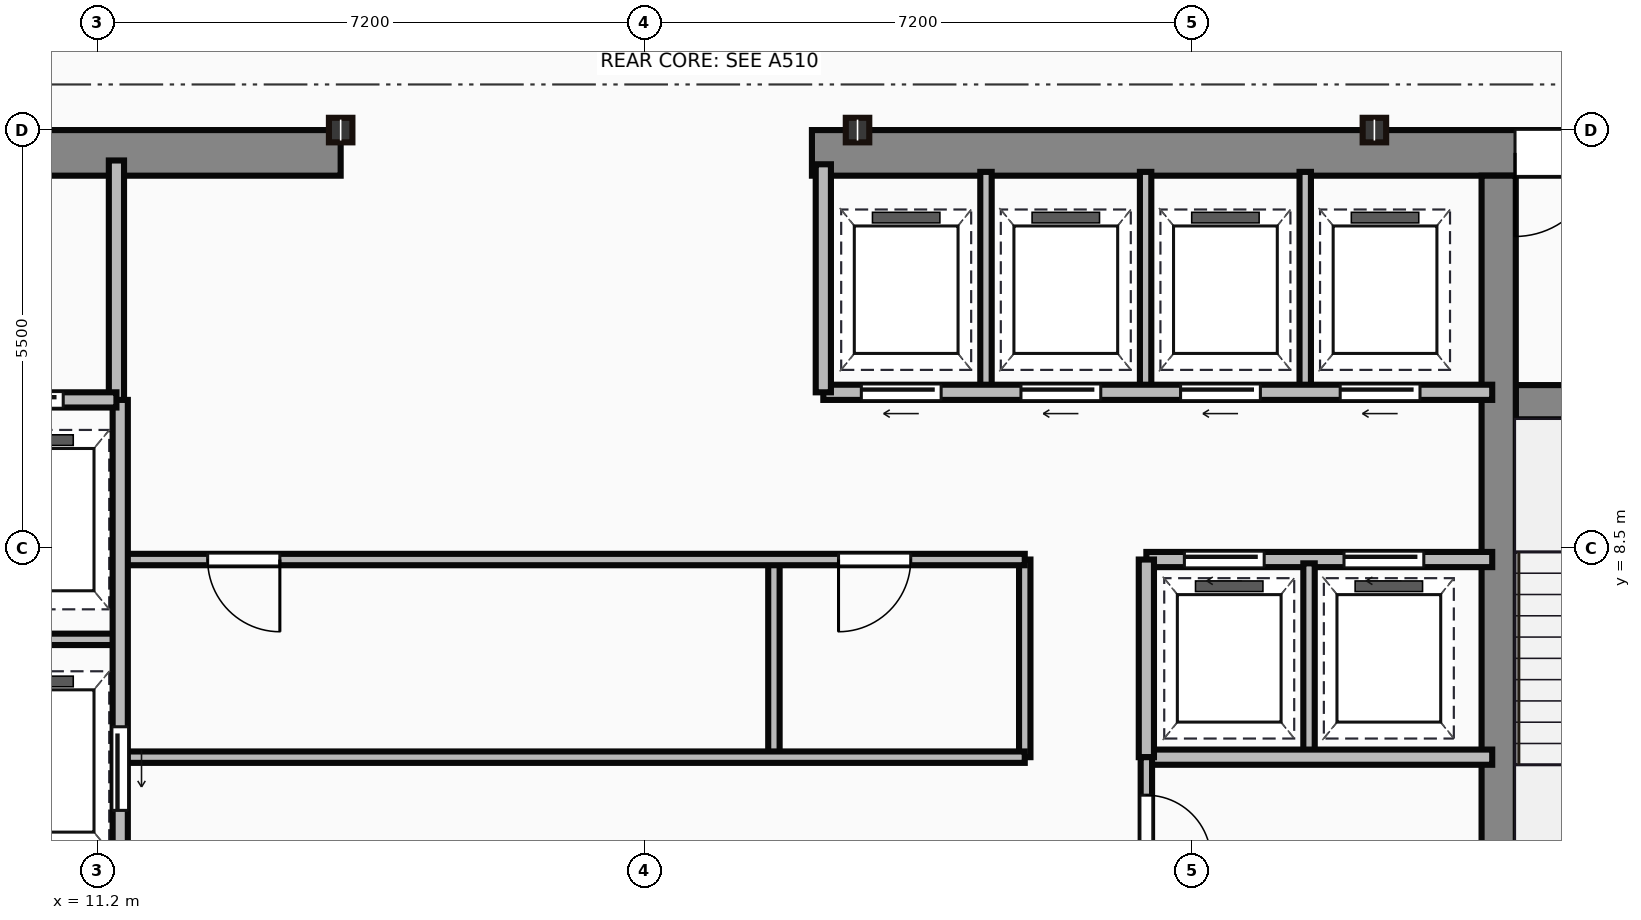
"""IFC4 building model, lengths in metres.
Left out: names, types, materials, properties, quantities, classifications, styles, units other than length and angle.
Written with IfcOpenShell. Run it as: python <this file> out.ifc"""

import sys

from ifc_helpers import new_model, si_unit, direction, frame, frame_2d, origin, origin_2d, place, context, subcontext, project, spatial, rectangle, i_section, extrude, source, transform, mapped, element, fill, save


model = new_model("IFC4")
c1 = context("Model", 3, precision=1e-05, world=origin(), true_north=direction((0.0, 1.0)))
c2 = subcontext(c1, "Body", "Model", "MODEL_VIEW")
j1 = project(units=[si_unit("LENGTHUNIT", "METRE"), si_unit("PLANEANGLEUNIT", "RADIAN")], contexts=[c1])
p1 = place(None, origin())
s1 = spatial("IfcSite", under=j1, at=p1, CompositionType="ELEMENT")
p2 = place(p1, origin())
s2 = spatial("IfcBuilding", under=s1, at=p2, CompositionType="ELEMENT")
p3 = place(p2, frame((0.0, 0.0, 244.2)))
s3 = spatial("IfcBuildingStorey", under=s2, at=p3, CompositionType="ELEMENT", Elevation=244.2)
m1 = source(origin(), c2, "Body", "SweptSolid", [
    extrude(rectangle(XDim=9.1, YDim=0.6, at=frame_2d((4.55, 0.0))), origin(), (0.0, 0.0, 1.0), 3.65),
])
p4 = place(p3, frame((5.3, 13.7, 0.0), z_axis=(0.0, 0.0, 1.0), x_axis=(1.0, 0.0, 0.0)))
e1 = element("IfcWall", 1, at=p4, inside=s3, PredefinedType="SHEAR", context=c2, shape_type="MappedRepresentation", body=[
    mapped(m1, transform((0.0, 0.0, 0.0))),
])
p5 = place(p4, frame((4.1, 0.0, 0.0)))
e2 = element("IfcOpeningElement", 2, at=p5, cuts=e1, PredefinedType="OPENING", context=c2, shape_type="SweptSolid", body=[
    extrude(rectangle(XDim=1.1, YDim=2.15, at=frame_2d((0.55, 1.075))), frame((0.0, 0.31, 0.0), z_axis=(0.0, -1.0, 0.0), x_axis=(1.0, 0.0, 0.0)), (0.0, 0.0, 1.0), 0.62),
])
m2 = source(origin(), c2, "Body", "SweptSolid", [
    extrude(rectangle(XDim=12.6, YDim=0.6, at=frame_2d((6.3, 0.0))), origin(), (0.0, 0.0, 1.0), 3.65),
])
p6 = place(p3, frame((20.6, 13.7, 0.0), z_axis=(0.0, 0.0, 1.0), x_axis=(1.0, 0.0, 0.0)))
e3 = element("IfcWall", 3, at=p6, inside=s3, PredefinedType="SHEAR", context=c2, shape_type="MappedRepresentation", body=[
    mapped(m2, transform((0.0, 0.0, 0.0))),
])
p7 = place(p6, frame((9.25, 0.0, 0.0)))
e4 = element("IfcOpeningElement", 4, at=p7, cuts=e3, PredefinedType="OPENING", context=c2, shape_type="SweptSolid", body=[
    extrude(rectangle(XDim=1.1, YDim=2.15, at=frame_2d((0.55, 1.075))), frame((0.0, 0.31, 0.0), z_axis=(0.0, -1.0, 0.0), x_axis=(1.0, 0.0, 0.0)), (0.0, 0.0, 1.0), 0.62),
])
m3 = source(origin(), c2, "Body", "SweptSolid", [
    extrude(rectangle(XDim=12.5, YDim=0.45, at=frame_2d((6.25, 0.0))), origin(), (0.0, 0.0, 1.0), 3.65),
])
p8 = place(p3, frame((29.635, 0.9, 0.0), z_axis=(0.0, 0.0, 1.0), x_axis=(0.0, 1.0, 0.0)))
e5 = element("IfcWall", 5, at=p8, inside=s3, PredefinedType="SHEAR", context=c2, shape_type="MappedRepresentation", body=[
    mapped(m3, transform((0.0, 0.0, 0.0))),
])
m4 = source(origin(), c2, "Body", "SweptSolid", [
    extrude(rectangle(XDim=3.39, YDim=0.45, at=frame_2d((1.695, 0.0))), origin(), (0.0, 0.0, 1.0), 3.65),
])
p9 = place(p3, frame((29.86, 10.42, 0.0), z_axis=(0.0, 0.0, 1.0), x_axis=(1.0, 0.0, 0.0)))
e6 = element("IfcWall", 6, at=p9, inside=s3, PredefinedType="SHEAR", context=c2, shape_type="MappedRepresentation", body=[
    mapped(m4, transform((0.0, 0.0, 0.0))),
])
p10 = place(p9, frame((1.1, 0.0, 0.0)))
e7 = element("IfcOpeningElement", 7, at=p10, cuts=e6, PredefinedType="OPENING", context=c2, shape_type="SweptSolid", body=[
    extrude(rectangle(XDim=1.1, YDim=2.15, at=frame_2d((0.55, 1.075))), frame((0.0, 0.235, 0.0), z_axis=(0.0, -1.0, 0.0), x_axis=(1.0, 0.0, 0.0)), (0.0, 0.0, 1.0), 0.47),
])
m5 = source(origin(), c2, "Body", "SweptSolid", [
    extrude(i_section(OverallWidth=0.309, OverallDepth=0.323, WebThickness=0.014, FlangeThickness=0.023, at=origin_2d()), origin(), (0.0, 0.0, 1.0), 3.65),
])
for number, where, z_axis, x_axis in (
    (8, (14.4, 14.0, 0.0), (0.0, 0.0, 1.0), (1.0, 0.0, 0.0)),
    (9, (21.2, 14.0, 0.0), (0.0, 0.0, 1.0), (1.0, 0.0, 0.0)),
    (10, (28.0, 14.0, 0.0), (0.0, 0.0, 1.0), (1.0, 0.0, 0.0)),
):
    element("IfcColumn", number, at=place(p3, frame(where, z_axis=z_axis, x_axis=x_axis)), inside=s3, PredefinedType="COLUMN", context=c2, shape_type="MappedRepresentation", body=[
        mapped(m5, transform((0.0, 0.0, 0.0))),
    ])
m6 = source(origin(), c2, "Body", "SweptSolid", [
    extrude(rectangle(XDim=3.18, YDim=0.2, at=frame_2d((1.59, 0.0))), origin(), (0.0, 0.0, 1.0), 3.4),
])
p11 = place(p3, frame((11.45, 10.42, 0.0), z_axis=(0.0, 0.0, 1.0), x_axis=(0.0, 1.0, 0.0)))
e11 = element("IfcWall", 11, at=p11, inside=s3, PredefinedType="PARTITIONING", context=c2, shape_type="MappedRepresentation", body=[
    mapped(m6, transform((0.0, 0.0, 0.0))),
])
m7 = source(origin(), c2, "Body", "SweptSolid", [
    extrude(rectangle(XDim=2.35, YDim=0.2, at=frame_2d((1.175, 0.0))), origin(), (0.0, 0.0, 1.0), 3.4),
])
p12 = place(p3, frame((9.1, 10.45, 0.0), z_axis=(0.0, 0.0, 1.0), x_axis=(1.0, 0.0, 0.0)))
e12 = element("IfcWall", 12, at=p12, inside=s3, PredefinedType="PARTITIONING", context=c2, shape_type="MappedRepresentation", body=[
    mapped(m7, transform((0.0, 0.0, 0.0))),
])
p13 = place(p12, frame((0.55, 0.0, 0.0)))
e13 = element("IfcOpeningElement", 13, at=p13, cuts=e12, PredefinedType="OPENING", context=c2, shape_type="SweptSolid", body=[
    extrude(rectangle(XDim=1.1, YDim=2.15, at=frame_2d((0.55, 1.075))), frame((0.0, 0.11, 0.0), z_axis=(0.0, -1.0, 0.0), x_axis=(1.0, 0.0, 0.0)), (0.0, 0.0, 1.0), 0.22),
])
m8 = source(origin(), c2, "Body", "SweptSolid", [
    extrude(rectangle(XDim=9.6, YDim=0.2, at=frame_2d((4.8, 0.0))), origin(), (0.0, 0.0, 1.0), 3.4),
])
p14 = place(p3, frame((11.5, 0.85, 0.0), z_axis=(0.0, 0.0, 1.0), x_axis=(0.0, 1.0, 0.0)))
e14 = element("IfcWall", 14, at=p14, inside=s3, PredefinedType="PARTITIONING", context=c2, shape_type="MappedRepresentation", body=[
    mapped(m8, transform((0.0, 0.0, 0.0))),
])
p15 = place(p14, frame((4.2, 0.0, 0.0)))
e15 = element("IfcOpeningElement", 15, at=p15, cuts=e14, PredefinedType="OPENING", context=c2, shape_type="SweptSolid", body=[
    extrude(rectangle(XDim=1.1, YDim=2.15, at=frame_2d((0.55, 1.075))), frame((0.0, 0.11, 0.0), z_axis=(0.0, -1.0, 0.0), x_axis=(1.0, 0.0, 0.0)), (0.0, 0.0, 1.0), 0.22),
])
p16 = place(p14, frame((0.9, 0.0, 0.0)))
e16 = element("IfcOpeningElement", 16, at=p16, cuts=e14, PredefinedType="OPENING", context=c2, shape_type="SweptSolid", body=[
    extrude(rectangle(XDim=1.2, YDim=2.15, at=frame_2d((0.6, 1.075))), frame((0.0, 0.11, 0.0), z_axis=(0.0, -1.0, 0.0), x_axis=(1.0, 0.0, 0.0)), (0.0, 0.0, 1.0), 0.22),
])
m9 = source(origin(), c2, "Body", "SweptSolid", [
    extrude(rectangle(XDim=2.4, YDim=0.15, at=frame_2d((1.2, 0.0))), origin(), (0.0, 0.0, 1.0), 3.4),
])
p17 = place(p3, frame((9.1, 7.3, 0.0), z_axis=(0.0, 0.0, 1.0), x_axis=(1.0, 0.0, 0.0)))
e17 = element("IfcWall", 17, at=p17, inside=s3, PredefinedType="PARTITIONING", context=c2, shape_type="MappedRepresentation", body=[
    mapped(m9, transform((0.0, 0.0, 0.0))),
])
m10 = source(origin(), c2, "Body", "SweptSolid", [
    extrude(rectangle(XDim=11.85, YDim=0.15, at=frame_2d((5.925, 0.0))), origin(), (0.0, 0.0, 1.0), 3.4),
])
p18 = place(p3, frame((11.55, 5.75, 0.0), z_axis=(0.0, 0.0, 1.0), x_axis=(1.0, 0.0, 0.0)))
e18 = element("IfcWall", 18, at=p18, inside=s3, PredefinedType="PARTITIONING", context=c2, shape_type="MappedRepresentation", body=[
    mapped(m10, transform((0.0, 0.0, 0.0))),
])
p19 = place(p3, frame((11.55, 8.35, 0.0), z_axis=(0.0, 0.0, 1.0), x_axis=(1.0, 0.0, 0.0)))
e19 = element("IfcWall", 19, at=p19, inside=s3, PredefinedType="PARTITIONING", context=c2, shape_type="MappedRepresentation", body=[
    mapped(m10, transform((0.0, 0.0, 0.0))),
])
p20 = place(p19, frame((1.1, 0.0, 0.0)))
e20 = element("IfcOpeningElement", 20, at=p20, cuts=e19, PredefinedType="OPENING", context=c2, shape_type="SweptSolid", body=[
    extrude(rectangle(XDim=0.95, YDim=2.15, at=frame_2d((0.475, 1.075))), frame((0.0, 0.085, 0.0), z_axis=(0.0, -1.0, 0.0), x_axis=(1.0, 0.0, 0.0)), (0.0, 0.0, 1.0), 0.17),
])
p21 = place(p19, frame((9.4, 0.0, 0.0)))
e21 = element("IfcOpeningElement", 21, at=p21, cuts=e19, PredefinedType="OPENING", context=c2, shape_type="SweptSolid", body=[
    extrude(rectangle(XDim=0.95, YDim=2.15, at=frame_2d((0.475, 1.075))), frame((0.0, 0.085, 0.0), z_axis=(0.0, -1.0, 0.0), x_axis=(1.0, 0.0, 0.0)), (0.0, 0.0, 1.0), 0.17),
])
m11 = source(origin(), c2, "Body", "SweptSolid", [
    extrude(rectangle(XDim=2.6, YDim=0.15, at=frame_2d((1.3, 0.0))), origin(), (0.0, 0.0, 1.0), 3.4),
])
p22 = place(p3, frame((23.4, 5.75, 0.0), z_axis=(0.0, 0.0, 1.0), x_axis=(0.0, 1.0, 0.0)))
e22 = element("IfcWall", 22, at=p22, inside=s3, PredefinedType="PARTITIONING", context=c2, shape_type="MappedRepresentation", body=[
    mapped(m11, transform((0.0, 0.0, 0.0))),
])
m12 = source(origin(), c2, "Body", "SweptSolid", [
    extrude(rectangle(XDim=2.5, YDim=0.15, at=frame_2d((1.25, 0.0))), origin(), (0.0, 0.0, 1.0), 3.4),
])
p23 = place(p3, frame((20.1, 5.8, 0.0), z_axis=(0.0, 0.0, 1.0), x_axis=(0.0, 1.0, 0.0)))
e23 = element("IfcWall", 23, at=p23, inside=s3, PredefinedType="PARTITIONING", context=c2, shape_type="MappedRepresentation", body=[
    mapped(m12, transform((0.0, 0.0, 0.0))),
])
m13 = source(origin(), c2, "Body", "SweptSolid", [
    extrude(rectangle(XDim=8.8, YDim=0.2, at=frame_2d((4.4, 0.0))), origin(), (0.0, 0.0, 1.0), 3.4),
])
p24 = place(p3, frame((20.75, 10.55, 0.0), z_axis=(0.0, 0.0, 1.0), x_axis=(1.0, 0.0, 0.0)))
e24 = element("IfcWall", 24, at=p24, inside=s3, PredefinedType="PARTITIONING", context=c2, shape_type="MappedRepresentation", body=[
    mapped(m13, transform((0.0, 0.0, 0.0))),
])
p25 = place(p24, frame((0.5, 0.0, 0.0)))
e25 = element("IfcOpeningElement", 25, at=p25, cuts=e24, PredefinedType="OPENING", context=c2, shape_type="SweptSolid", body=[
    extrude(rectangle(XDim=1.05, YDim=2.15, at=frame_2d((0.525, 1.075))), frame((0.0, 0.11, 0.0), z_axis=(0.0, -1.0, 0.0), x_axis=(1.0, 0.0, 0.0)), (0.0, 0.0, 1.0), 0.22),
])
p26 = place(p24, frame((2.6, 0.0, 0.0)))
e26 = element("IfcOpeningElement", 26, at=p26, cuts=e24, PredefinedType="OPENING", context=c2, shape_type="SweptSolid", body=[
    extrude(rectangle(XDim=1.05, YDim=2.15, at=frame_2d((0.525, 1.075))), frame((0.0, 0.11, 0.0), z_axis=(0.0, -1.0, 0.0), x_axis=(1.0, 0.0, 0.0)), (0.0, 0.0, 1.0), 0.22),
])
p27 = place(p24, frame((4.7, 0.0, 0.0)))
e27 = element("IfcOpeningElement", 27, at=p27, cuts=e24, PredefinedType="OPENING", context=c2, shape_type="SweptSolid", body=[
    extrude(rectangle(XDim=1.05, YDim=2.15, at=frame_2d((0.525, 1.075))), frame((0.0, 0.11, 0.0), z_axis=(0.0, -1.0, 0.0), x_axis=(1.0, 0.0, 0.0)), (0.0, 0.0, 1.0), 0.22),
])
p28 = place(p24, frame((6.8, 0.0, 0.0)))
e28 = element("IfcOpeningElement", 28, at=p28, cuts=e24, PredefinedType="OPENING", context=c2, shape_type="SweptSolid", body=[
    extrude(rectangle(XDim=1.05, YDim=2.15, at=frame_2d((0.525, 1.075))), frame((0.0, 0.11, 0.0), z_axis=(0.0, -1.0, 0.0), x_axis=(1.0, 0.0, 0.0)), (0.0, 0.0, 1.0), 0.22),
])
m14 = source(origin(), c2, "Body", "SweptSolid", [
    extrude(rectangle(XDim=3.0, YDim=0.2, at=frame_2d((1.5, 0.0))), origin(), (0.0, 0.0, 1.0), 3.4),
])
p29 = place(p3, frame((20.75, 10.55, 0.0), z_axis=(0.0, 0.0, 1.0), x_axis=(0.0, 1.0, 0.0)))
e29 = element("IfcWall", 29, at=p29, inside=s3, PredefinedType="PARTITIONING", context=c2, shape_type="MappedRepresentation", body=[
    mapped(m14, transform((0.0, 0.0, 0.0))),
])
m15 = source(origin(), c2, "Body", "SweptSolid", [
    extrude(rectangle(XDim=2.85, YDim=0.15, at=frame_2d((1.425, 0.0))), origin(), (0.0, 0.0, 1.0), 3.4),
])
for number, where, z_axis, x_axis in (
    (30, (22.89, 10.6, 0.0), (0.0, 0.0, 1.0), (0.0, 1.0, 0.0)),
    (31, (24.99, 10.6, 0.0), (0.0, 0.0, 1.0), (0.0, 1.0, 0.0)),
    (32, (27.09, 10.6, 0.0), (0.0, 0.0, 1.0), (0.0, 1.0, 0.0)),
):
    element("IfcWall", number, at=place(p3, frame(where, z_axis=z_axis, x_axis=x_axis)), inside=s3, PredefinedType="PARTITIONING", context=c2, shape_type="MappedRepresentation", body=[
        mapped(m15, transform((0.0, 0.0, 0.0))),
    ])
m16 = source(origin(), c2, "Body", "SweptSolid", [
    extrude(rectangle(XDim=4.55, YDim=0.2, at=frame_2d((2.275, 0.0))), origin(), (0.0, 0.0, 1.0), 3.4),
])
p30 = place(p3, frame((25.0, 8.35, 0.0), z_axis=(0.0, 0.0, 1.0), x_axis=(1.0, 0.0, 0.0)))
e33 = element("IfcWall", 33, at=p30, inside=s3, PredefinedType="PARTITIONING", context=c2, shape_type="MappedRepresentation", body=[
    mapped(m16, transform((0.0, 0.0, 0.0))),
])
p31 = place(p30, frame((0.5, 0.0, 0.0)))
e34 = element("IfcOpeningElement", 34, at=p31, cuts=e33, PredefinedType="OPENING", context=c2, shape_type="SweptSolid", body=[
    extrude(rectangle(XDim=1.05, YDim=2.15, at=frame_2d((0.525, 1.075))), frame((0.0, 0.11, 0.0), z_axis=(0.0, -1.0, 0.0), x_axis=(1.0, 0.0, 0.0)), (0.0, 0.0, 1.0), 0.22),
])
p32 = place(p30, frame((2.6, 0.0, 0.0)))
e35 = element("IfcOpeningElement", 35, at=p32, cuts=e33, PredefinedType="OPENING", context=c2, shape_type="SweptSolid", body=[
    extrude(rectangle(XDim=1.05, YDim=2.15, at=frame_2d((0.525, 1.075))), frame((0.0, 0.11, 0.0), z_axis=(0.0, -1.0, 0.0), x_axis=(1.0, 0.0, 0.0)), (0.0, 0.0, 1.0), 0.22),
])
p33 = place(p3, frame((25.0, 5.75, 0.0), z_axis=(0.0, 0.0, 1.0), x_axis=(1.0, 0.0, 0.0)))
e36 = element("IfcWall", 36, at=p33, inside=s3, PredefinedType="PARTITIONING", context=c2, shape_type="MappedRepresentation", body=[
    mapped(m16, transform((0.0, 0.0, 0.0))),
])
m17 = source(origin(), c2, "Body", "SweptSolid", [
    extrude(rectangle(XDim=2.6, YDim=0.2, at=frame_2d((1.3, 0.0))), origin(), (0.0, 0.0, 1.0), 3.4),
])
p34 = place(p3, frame((25.0, 5.75, 0.0), z_axis=(0.0, 0.0, 1.0), x_axis=(0.0, 1.0, 0.0)))
e37 = element("IfcWall", 37, at=p34, inside=s3, PredefinedType="PARTITIONING", context=c2, shape_type="MappedRepresentation", body=[
    mapped(m17, transform((0.0, 0.0, 0.0))),
])
p35 = place(p3, frame((27.14, 5.8, 0.0), z_axis=(0.0, 0.0, 1.0), x_axis=(0.0, 1.0, 0.0)))
e38 = element("IfcWall", 38, at=p35, inside=s3, PredefinedType="PARTITIONING", context=c2, shape_type="MappedRepresentation", body=[
    mapped(m12, transform((0.0, 0.0, 0.0))),
])
m18 = source(origin(), c2, "Body", "SweptSolid", [
    extrude(rectangle(XDim=4.9, YDim=0.15, at=frame_2d((2.45, 0.0))), origin(), (0.0, 0.0, 1.0), 3.4),
])
p36 = place(p3, frame((25.0, 0.85, 0.0), z_axis=(0.0, 0.0, 1.0), x_axis=(0.0, 1.0, 0.0)))
e39 = element("IfcWall", 39, at=p36, inside=s3, PredefinedType="PARTITIONING", context=c2, shape_type="MappedRepresentation", body=[
    mapped(m18, transform((0.0, 0.0, 0.0))),
])
p37 = place(p36, frame((1.85, 0.0, 0.0)))
e40 = element("IfcOpeningElement", 40, at=p37, cuts=e39, PredefinedType="OPENING", context=c2, shape_type="SweptSolid", body=[
    extrude(rectangle(XDim=0.95, YDim=2.15, at=frame_2d((0.475, 1.075))), frame((0.0, 0.085, 0.0), z_axis=(0.0, -1.0, 0.0), x_axis=(1.0, 0.0, 0.0)), (0.0, 0.0, 1.0), 0.17),
])
p38 = place(p36, frame((3.55, 0.0, 0.0)))
e41 = element("IfcOpeningElement", 41, at=p38, cuts=e39, PredefinedType="OPENING", context=c2, shape_type="SweptSolid", body=[
    extrude(rectangle(XDim=0.85, YDim=2.15, at=frame_2d((0.425, 1.075))), frame((0.0, 0.085, 0.0), z_axis=(0.0, -1.0, 0.0), x_axis=(1.0, 0.0, 0.0)), (0.0, 0.0, 1.0), 0.17),
])
m19 = source(origin(), c2, "Body", "SweptSolid", [
    extrude(rectangle(XDim=1.1, YDim=2.15, at=frame_2d((0.55, 1.075))), frame((0.0, 0.025, 0.0), z_axis=(0.0, -1.0, 0.0), x_axis=(1.0, 0.0, 0.0)), (0.0, 0.0, 1.0), 0.05),
])
p39 = place(p7, origin())
e42 = element("IfcDoor", 42, at=p39, inside=s3, OperationType="SINGLE_SWING_LEFT", PredefinedType="DOOR", context=c2, shape_type="MappedRepresentation", body=[
    mapped(m19, transform((0.0, 0.0, 0.0))),
])
fill(e4, e42)
p40 = place(p13, origin())
e43 = element("IfcDoor", 43, at=p40, inside=s3, OperationType="SLIDING_TO_LEFT", PredefinedType="DOOR", context=c2, shape_type="MappedRepresentation", body=[
    mapped(m19, transform((0.0, 0.0, 0.0))),
])
fill(e13, e43)
p41 = place(p15, frame((1.1, 0.0, 0.0), z_axis=(0.0, 0.0, 1.0), x_axis=(-1.0, 0.0, 0.0)))
e44 = element("IfcDoor", 44, at=p41, inside=s3, OperationType="SLIDING_TO_LEFT", PredefinedType="DOOR", context=c2, shape_type="MappedRepresentation", body=[
    mapped(m19, transform((0.0, 0.0, 0.0))),
])
fill(e15, e44)
m20 = source(origin(), c2, "Body", "SweptSolid", [
    extrude(rectangle(XDim=0.95, YDim=2.15, at=frame_2d((0.475, 1.075))), frame((0.0, 0.025, 0.0), z_axis=(0.0, -1.0, 0.0), x_axis=(1.0, 0.0, 0.0)), (0.0, 0.0, 1.0), 0.05),
])
p42 = place(p20, origin())
e45 = element("IfcDoor", 45, at=p42, inside=s3, OperationType="SINGLE_SWING_RIGHT", PredefinedType="DOOR", context=c2, shape_type="MappedRepresentation", body=[
    mapped(m20, transform((0.0, 0.0, 0.0))),
])
fill(e20, e45)
p43 = place(p21, origin())
e46 = element("IfcDoor", 46, at=p43, inside=s3, OperationType="SINGLE_SWING_LEFT", PredefinedType="DOOR", context=c2, shape_type="MappedRepresentation", body=[
    mapped(m20, transform((0.0, 0.0, 0.0))),
])
fill(e21, e46)
m21 = source(origin(), c2, "Body", "SweptSolid", [
    extrude(rectangle(XDim=1.05, YDim=2.15, at=frame_2d((0.525, 1.075))), frame((0.0, 0.025, 0.0), z_axis=(0.0, -1.0, 0.0), x_axis=(1.0, 0.0, 0.0)), (0.0, 0.0, 1.0), 0.05),
])
p44 = place(p25, frame((1.05, 0.0, 0.0), z_axis=(0.0, 0.0, 1.0), x_axis=(-1.0, 0.0, 0.0)))
e47 = element("IfcDoor", 47, at=p44, inside=s3, OperationType="SLIDING_TO_LEFT", PredefinedType="DOOR", context=c2, shape_type="MappedRepresentation", body=[
    mapped(m21, transform((0.0, 0.0, 0.0))),
])
fill(e25, e47)
p45 = place(p26, frame((1.05, 0.0, 0.0), z_axis=(0.0, 0.0, 1.0), x_axis=(-1.0, 0.0, 0.0)))
e48 = element("IfcDoor", 48, at=p45, inside=s3, OperationType="SLIDING_TO_LEFT", PredefinedType="DOOR", context=c2, shape_type="MappedRepresentation", body=[
    mapped(m21, transform((0.0, 0.0, 0.0))),
])
fill(e26, e48)
p46 = place(p27, frame((1.05, 0.0, 0.0), z_axis=(0.0, 0.0, 1.0), x_axis=(-1.0, 0.0, 0.0)))
e49 = element("IfcDoor", 49, at=p46, inside=s3, OperationType="SLIDING_TO_LEFT", PredefinedType="DOOR", context=c2, shape_type="MappedRepresentation", body=[
    mapped(m21, transform((0.0, 0.0, 0.0))),
])
fill(e27, e49)
p47 = place(p28, frame((1.05, 0.0, 0.0), z_axis=(0.0, 0.0, 1.0), x_axis=(-1.0, 0.0, 0.0)))
e50 = element("IfcDoor", 50, at=p47, inside=s3, OperationType="SLIDING_TO_LEFT", PredefinedType="DOOR", context=c2, shape_type="MappedRepresentation", body=[
    mapped(m21, transform((0.0, 0.0, 0.0))),
])
fill(e28, e50)
p48 = place(p31, origin())
e51 = element("IfcDoor", 51, at=p48, inside=s3, OperationType="SLIDING_TO_LEFT", PredefinedType="DOOR", context=c2, shape_type="MappedRepresentation", body=[
    mapped(m21, transform((0.0, 0.0, 0.0))),
])
fill(e34, e51)
p49 = place(p32, origin())
e52 = element("IfcDoor", 52, at=p49, inside=s3, OperationType="SLIDING_TO_LEFT", PredefinedType="DOOR", context=c2, shape_type="MappedRepresentation", body=[
    mapped(m21, transform((0.0, 0.0, 0.0))),
])
fill(e35, e52)
m22 = source(origin(), c2, "Body", "SweptSolid", [
    extrude(rectangle(XDim=0.85, YDim=2.15, at=frame_2d((0.425, 1.075))), frame((0.0, 0.025, 0.0), z_axis=(0.0, -1.0, 0.0), x_axis=(1.0, 0.0, 0.0)), (0.0, 0.0, 1.0), 0.05),
])
p50 = place(p38, origin())
e53 = element("IfcDoor", 53, at=p50, inside=s3, OperationType="SINGLE_SWING_LEFT", PredefinedType="DOOR", context=c2, shape_type="MappedRepresentation", body=[
    mapped(m22, transform((0.0, 0.0, 0.0))),
])
fill(e41, e53)
save(model, sys.argv[1])
